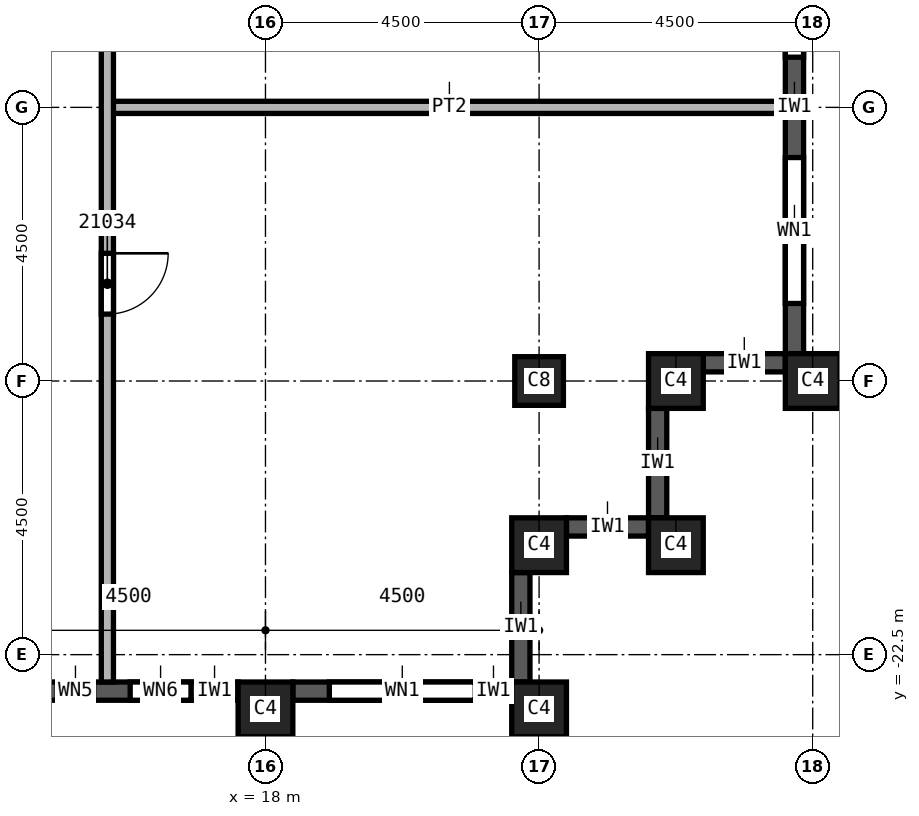
"""IFC4 building model, lengths in metres.
Left out: names, types, materials, properties, quantities, classifications, styles, units other than length and angle.
Written with IfcOpenShell. Run it as: python <this file> out.ifc"""

import sys

from ifc_helpers import new_model, si_unit, direction, frame, frame_2d, origin, origin_2d, place, context, subcontext, project, spatial, rectangle, extrude, element, fill, save


model = new_model("IFC4")
c1 = context("Model", 3, precision=1e-05, world=origin(), true_north=direction((0.0, 1.0)))
c2 = subcontext(c1, "Body", "Model", "MODEL_VIEW")
j1 = project(units=[si_unit("LENGTHUNIT", "METRE"), si_unit("PLANEANGLEUNIT", "RADIAN")], contexts=[c1])
p1 = place(None, origin())
s1 = spatial("IfcSite", under=j1, at=p1, CompositionType="ELEMENT")
p2 = place(p1, origin())
s2 = spatial("IfcBuilding", under=s1, at=p2, CompositionType="ELEMENT")
p3 = place(p2, frame((0.0, 0.0, 300.0)))
s3 = spatial("IfcBuildingStorey", under=s2, at=p3, CompositionType="ELEMENT", Elevation=300.0)
p4 = place(p3, frame((22.5, -18.0, 0.0), z_axis=(0.0, 0.0, 1.0), x_axis=(1.0, 0.0, 0.0)))
e1 = element("IfcColumn", 1, at=p4, inside=s3, PredefinedType="COLUMN", context=c2, shape_type="SweptSolid", body=[
    extrude(rectangle(XDim=0.8, YDim=0.8, at=origin_2d()), origin(), (0.0, 0.0, 1.0), 3.74),
])
for number, where, z_axis, x_axis in (
    (2, (27.0, -18.0, 0.0), (0.0, 0.0, 1.0), (0.0, 1.0, 0.0)),
    (3, (18.0, -23.4, 0.0), (0.0, 0.0, 1.0), (1.0, 0.0, 0.0)),
    (4, (22.5, -23.4, 0.0), (0.0, 0.0, 1.0), (1.0, 0.0, 0.0)),
    (5, (22.5, -20.7, 0.0), (0.0, 0.0, 1.0), (1.0, 0.0, 0.0)),
    (6, (24.75, -20.7, 0.0), (0.0, 0.0, 1.0), (1.0, 0.0, 0.0)),
    (7, (24.75, -18.0, 0.0), (0.0, 0.0, 1.0), (1.0, 0.0, 0.0)),
):
    element("IfcColumn", number, at=place(p3, frame(where, z_axis=z_axis, x_axis=x_axis)), inside=s3, PredefinedType="COLUMN", context=c2, shape_type="SweptSolid", body=[
        extrude(rectangle(XDim=0.9, YDim=0.9, at=origin_2d()), origin(), (0.0, 0.0, 1.0), 3.74),
    ])
p5 = place(p3, frame((13.95, -23.1, 0.0), z_axis=(0.0, 0.0, 1.0), x_axis=(1.0, 0.0, 0.0)))
e8 = element("IfcWall", 8, at=p5, inside=s3, PredefinedType="SOLIDWALL", context=c2, shape_type="SweptSolid", body=[
    extrude(rectangle(XDim=3.6, YDim=0.3, at=frame_2d((1.8, 0.0))), origin(), (0.0, 0.0, 1.0), 3.14),
])
p6 = place(p5, frame((0.625, 0.0, 0.8)))
e9 = element("IfcOpeningElement", 9, at=p6, cuts=e8, PredefinedType="OPENING", context=c2, shape_type="SweptSolid", body=[
    extrude(rectangle(XDim=0.6, YDim=1.95, at=frame_2d((0.3, 0.975))), frame((0.0, 0.15, 0.0), z_axis=(0.0, -1.0, 0.0), x_axis=(1.0, 0.0, 0.0)), (0.0, 0.0, 1.0), 0.3),
])
p7 = place(p5, frame((1.825, 0.0, 0.8)))
e10 = element("IfcOpeningElement", 10, at=p7, cuts=e8, PredefinedType="OPENING", context=c2, shape_type="SweptSolid", body=[
    extrude(rectangle(XDim=1.0, YDim=1.95, at=frame_2d((0.5, 0.975))), frame((0.0, 0.15, 0.0), z_axis=(0.0, -1.0, 0.0), x_axis=(1.0, 0.0, 0.0)), (0.0, 0.0, 1.0), 0.3),
])
p8 = place(p3, frame((18.45, -23.1, 0.0), z_axis=(0.0, 0.0, 1.0), x_axis=(1.0, 0.0, 0.0)))
e11 = element("IfcWall", 11, at=p8, inside=s3, PredefinedType="SOLIDWALL", context=c2, shape_type="SweptSolid", body=[
    extrude(rectangle(XDim=3.6, YDim=0.3, at=frame_2d((1.8, 0.0))), origin(), (0.0, 0.0, 1.0), 3.14),
])
p9 = place(p8, frame((0.6, 0.0, 0.8)))
e12 = element("IfcOpeningElement", 12, at=p9, cuts=e11, PredefinedType="OPENING", context=c2, shape_type="SweptSolid", body=[
    extrude(rectangle(XDim=2.4, YDim=1.95, at=frame_2d((1.2, 0.975))), frame((0.0, 0.15, 0.0), z_axis=(0.0, -1.0, 0.0), x_axis=(1.0, 0.0, 0.0)), (0.0, 0.0, 1.0), 0.3),
])
p10 = place(p3, frame((22.2, -22.95, 0.0), z_axis=(0.0, 0.0, 1.0), x_axis=(0.0, 1.0, 0.0)))
e13 = element("IfcWall", 13, at=p10, inside=s3, PredefinedType="SOLIDWALL", context=c2, shape_type="SweptSolid", body=[
    extrude(rectangle(XDim=1.8, YDim=0.3, at=frame_2d((0.9, 0.0))), origin(), (0.0, 0.0, 1.0), 3.14),
])
p11 = place(p3, frame((22.95, -20.4, 0.0), z_axis=(0.0, 0.0, 1.0), x_axis=(1.0, 0.0, 0.0)))
e14 = element("IfcWall", 14, at=p11, inside=s3, PredefinedType="SOLIDWALL", context=c2, shape_type="SweptSolid", body=[
    extrude(rectangle(XDim=1.35, YDim=0.3, at=frame_2d((0.675, 0.0))), origin(), (0.0, 0.0, 1.0), 3.14),
])
p12 = place(p3, frame((24.45, -20.25, 0.0), z_axis=(0.0, 0.0, 1.0), x_axis=(0.0, 1.0, 0.0)))
e15 = element("IfcWall", 15, at=p12, inside=s3, PredefinedType="SOLIDWALL", context=c2, shape_type="SweptSolid", body=[
    extrude(rectangle(XDim=1.8, YDim=0.3, at=frame_2d((0.9, 0.0))), origin(), (0.0, 0.0, 1.0), 3.14),
])
p13 = place(p3, frame((25.2, -17.7, 0.0), z_axis=(0.0, 0.0, 1.0), x_axis=(1.0, 0.0, 0.0)))
e16 = element("IfcWall", 16, at=p13, inside=s3, PredefinedType="SOLIDWALL", context=c2, shape_type="SweptSolid", body=[
    extrude(rectangle(XDim=1.35, YDim=0.3, at=frame_2d((0.675, 0.0))), origin(), (0.0, 0.0, 1.0), 3.14),
])
p14 = place(p3, frame((26.7, -17.55, 0.0), z_axis=(0.0, 0.0, 1.0), x_axis=(0.0, 1.0, 0.0)))
e17 = element("IfcWall", 17, at=p14, inside=s3, PredefinedType="SOLIDWALL", context=c2, shape_type="SweptSolid", body=[
    extrude(rectangle(XDim=8.1, YDim=0.3, at=frame_2d((4.05, 0.0))), origin(), (0.0, 0.0, 1.0), 3.14),
])
p15 = place(p14, frame((0.825, 0.0, 0.8)))
e18 = element("IfcOpeningElement", 18, at=p15, cuts=e17, PredefinedType="OPENING", context=c2, shape_type="SweptSolid", body=[
    extrude(rectangle(XDim=2.4, YDim=1.95, at=frame_2d((1.2, 0.975))), frame((0.0, 0.15, 0.0), z_axis=(0.0, -1.0, 0.0), x_axis=(1.0, 0.0, 0.0)), (0.0, 0.0, 1.0), 0.3),
])
p16 = place(p14, frame((4.875, 0.0, 0.8)))
e19 = element("IfcOpeningElement", 19, at=p16, cuts=e17, PredefinedType="OPENING", context=c2, shape_type="SweptSolid", body=[
    extrude(rectangle(XDim=2.4, YDim=1.95, at=frame_2d((1.2, 0.975))), frame((0.0, 0.15, 0.0), z_axis=(0.0, -1.0, 0.0), x_axis=(1.0, 0.0, 0.0)), (0.0, 0.0, 1.0), 0.3),
])
p17 = place(p3, frame((15.4, -13.5, 0.0), z_axis=(0.0, 0.0, 1.0), x_axis=(1.0, 0.0, 0.0)))
e20 = element("IfcWall", 20, at=p17, inside=s3, PredefinedType="PARTITIONING", context=c2, shape_type="SweptSolid", body=[
    extrude(rectangle(XDim=11.15, YDim=0.2, at=frame_2d((5.575, 0.0))), origin(), (0.0, 0.0, 1.0), 3.74),
])
p18 = place(p3, frame((15.4, 22.95, 0.0), z_axis=(0.0, 0.0, 1.0), x_axis=(0.0, -1.0, 0.0)))
e21 = element("IfcWall", 21, at=p18, inside=s3, PredefinedType="PARTITIONING", context=c2, shape_type="SweptSolid", body=[
    extrude(rectangle(XDim=45.9, YDim=0.2, at=frame_2d((22.95, 0.0))), origin(), (0.0, 0.0, 1.0), 3.74),
])
p19 = place(p18, frame((20.7, 0.0, 0.0)))
e22 = element("IfcOpeningElement", 22, at=p19, cuts=e21, PredefinedType="OPENING", context=c2, shape_type="SweptSolid", body=[
    extrude(rectangle(XDim=1.0, YDim=2.1, at=frame_2d((0.5, 1.05))), frame((0.0, 0.1, 0.0), z_axis=(0.0, -1.0, 0.0), x_axis=(1.0, 0.0, 0.0)), (0.0, 0.0, 1.0), 0.2),
])
p20 = place(p18, frame((11.85, 0.0, 0.0)))
e23 = element("IfcOpeningElement", 23, at=p20, cuts=e21, PredefinedType="OPENING", context=c2, shape_type="SweptSolid", body=[
    extrude(rectangle(XDim=1.0, YDim=2.1, at=frame_2d((0.5, 1.05))), frame((0.0, 0.1, 0.0), z_axis=(0.0, -1.0, 0.0), x_axis=(1.0, 0.0, 0.0)), (0.0, 0.0, 1.0), 0.2),
])
p21 = place(p18, frame((4.725, 0.0, 0.0)))
e24 = element("IfcOpeningElement", 24, at=p21, cuts=e21, PredefinedType="OPENING", context=c2, shape_type="SweptSolid", body=[
    extrude(rectangle(XDim=1.0, YDim=2.1, at=frame_2d((0.5, 1.05))), frame((0.0, 0.1, 0.0), z_axis=(0.0, -1.0, 0.0), x_axis=(1.0, 0.0, 0.0)), (0.0, 0.0, 1.0), 0.2),
])
p22 = place(p18, frame((0.4, 0.0, 0.0)))
e25 = element("IfcOpeningElement", 25, at=p22, cuts=e21, PredefinedType="OPENING", context=c2, shape_type="SweptSolid", body=[
    extrude(rectangle(XDim=1.0, YDim=2.1, at=frame_2d((0.5, 1.05))), frame((0.0, 0.1, 0.0), z_axis=(0.0, -1.0, 0.0), x_axis=(1.0, 0.0, 0.0)), (0.0, 0.0, 1.0), 0.2),
])
p23 = place(p18, frame((38.85, 0.0, 0.0)))
e26 = element("IfcOpeningElement", 26, at=p23, cuts=e21, PredefinedType="OPENING", context=c2, shape_type="SweptSolid", body=[
    extrude(rectangle(XDim=1.0, YDim=2.1, at=frame_2d((0.5, 1.05))), frame((0.0, 0.1, 0.0), z_axis=(0.0, -1.0, 0.0), x_axis=(1.0, 0.0, 0.0)), (0.0, 0.0, 1.0), 0.2),
])
p24 = place(p18, frame((26.55, 0.0, 0.0)))
e27 = element("IfcOpeningElement", 27, at=p24, cuts=e21, PredefinedType="OPENING", context=c2, shape_type="SweptSolid", body=[
    extrude(rectangle(XDim=1.0, YDim=2.1, at=frame_2d((0.5, 1.05))), frame((0.0, 0.1, 0.0), z_axis=(0.0, -1.0, 0.0), x_axis=(1.0, 0.0, 0.0)), (0.0, 0.0, 1.0), 0.2),
])
p25 = place(p9, origin())
e28 = element("IfcWindow", 28, at=p25, inside=s3, PartitioningType="SINGLE_PANEL", PredefinedType="WINDOW", context=c2, shape_type="SweptSolid", body=[
    extrude(rectangle(XDim=2.4, YDim=1.95, at=frame_2d((1.2, 0.975))), frame((0.0, 0.03, 0.0), z_axis=(0.0, -1.0, 0.0), x_axis=(1.0, 0.0, 0.0)), (0.0, 0.0, 1.0), 0.06),
])
fill(e12, e28)
p26 = place(p15, origin())
e29 = element("IfcWindow", 29, at=p26, inside=s3, PartitioningType="SINGLE_PANEL", PredefinedType="WINDOW", context=c2, shape_type="SweptSolid", body=[
    extrude(rectangle(XDim=2.4, YDim=1.95, at=frame_2d((1.2, 0.975))), frame((0.0, 0.03, 0.0), z_axis=(0.0, -1.0, 0.0), x_axis=(1.0, 0.0, 0.0)), (0.0, 0.0, 1.0), 0.06),
])
fill(e18, e29)
p27 = place(p16, origin())
e30 = element("IfcWindow", 30, at=p27, inside=s3, PartitioningType="SINGLE_PANEL", PredefinedType="WINDOW", context=c2, shape_type="SweptSolid", body=[
    extrude(rectangle(XDim=2.4, YDim=1.95, at=frame_2d((1.2, 0.975))), frame((0.0, 0.03, 0.0), z_axis=(0.0, -1.0, 0.0), x_axis=(1.0, 0.0, 0.0)), (0.0, 0.0, 1.0), 0.06),
])
fill(e19, e30)
p28 = place(p23, origin())
e31 = element("IfcDoor", 31, at=p28, inside=s3, OperationType="SINGLE_SWING_LEFT", PredefinedType="DOOR", context=c2, shape_type="SweptSolid", body=[
    extrude(rectangle(XDim=1.0, YDim=2.1, at=frame_2d((0.5, 1.05))), frame((0.0, 0.025, 0.0), z_axis=(0.0, -1.0, 0.0), x_axis=(1.0, 0.0, 0.0)), (0.0, 0.0, 1.0), 0.05),
])
fill(e26, e31)
p29 = place(p6, origin())
e32 = element("IfcWindow", 32, at=p29, inside=s3, PartitioningType="SINGLE_PANEL", PredefinedType="WINDOW", context=c2, shape_type="SweptSolid", body=[
    extrude(rectangle(XDim=0.6, YDim=1.95, at=frame_2d((0.3, 0.975))), frame((0.0, 0.03, 0.0), z_axis=(0.0, -1.0, 0.0), x_axis=(1.0, 0.0, 0.0)), (0.0, 0.0, 1.0), 0.06),
])
fill(e9, e32)
p30 = place(p7, origin())
e33 = element("IfcWindow", 33, at=p30, inside=s3, PartitioningType="SINGLE_PANEL", PredefinedType="WINDOW", context=c2, shape_type="SweptSolid", body=[
    extrude(rectangle(XDim=1.0, YDim=1.95, at=frame_2d((0.5, 0.975))), frame((0.0, 0.03, 0.0), z_axis=(0.0, -1.0, 0.0), x_axis=(1.0, 0.0, 0.0)), (0.0, 0.0, 1.0), 0.06),
])
fill(e10, e33)
save(model, sys.argv[1])
